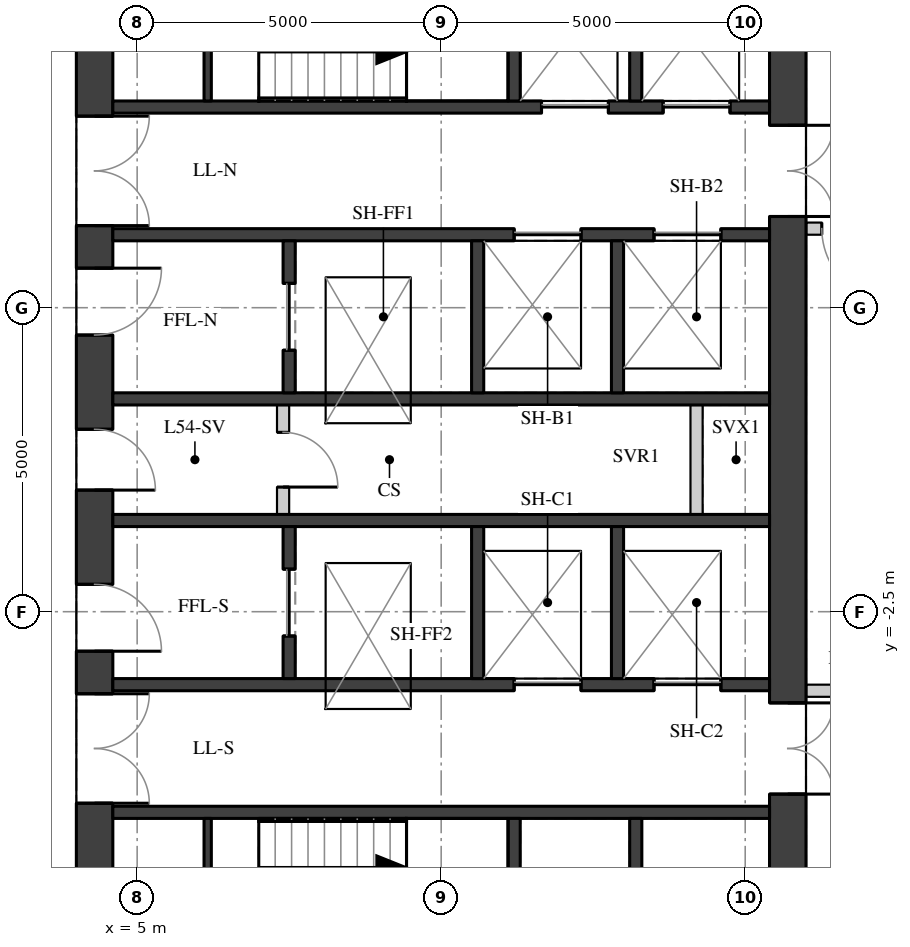
"""IFC4 building model, lengths in metres.
Left out: names, types, materials, properties, quantities, classifications, styles, units other than length and angle.
Written with IfcOpenShell. Run it as: python <this file> out.ifc"""

import sys

from ifc_helpers import new_model, si_unit, direction, frame, frame_2d, origin, place, context, subcontext, project, spatial, rectangle, extrude, element, fill, save


model = new_model("IFC4")
c1 = context("Model", 3, precision=1e-05, world=origin(), true_north=direction((0.0, 1.0)))
c2 = subcontext(c1, "Body", "Model", "MODEL_VIEW")
j1 = project(units=[si_unit("LENGTHUNIT", "METRE"), si_unit("PLANEANGLEUNIT", "RADIAN")], contexts=[c1])
p1 = place(None, origin())
s1 = spatial("IfcSite", under=j1, at=p1, CompositionType="ELEMENT")
p2 = place(p1, origin())
s2 = spatial("IfcBuilding", under=s1, at=p2, CompositionType="ELEMENT")
p3 = place(p2, frame((0.0, 0.0, 192.5)))
s3 = spatial("IfcBuildingStorey", under=s2, at=p3, CompositionType="ELEMENT", Elevation=192.5)
p4 = place(p3, frame((4.3, -9.4, 0.0), z_axis=(0.0, 0.0, 1.0), x_axis=(0.0, 1.0, 0.0)))
e1 = element("IfcWall", 1, at=p4, inside=s3, PredefinedType="SHEAR", context=c2, shape_type="SweptSolid", body=[
    extrude(rectangle(XDim=18.8, YDim=0.6, at=frame_2d((9.4, 0.0))), origin(), (0.0, 0.0, 1.0), 3.02),
])
p5 = place(p4, frame((0.65, 0.0, 0.0)))
e2 = element("IfcOpeningElement", 2, at=p5, cuts=e1, PredefinedType="OPENING", context=c2, shape_type="SweptSolid", body=[
    extrude(rectangle(XDim=1.5, YDim=2.1, at=frame_2d((0.75, 1.05))), frame((0.0, 0.31, 0.0), z_axis=(0.0, -1.0, 0.0), x_axis=(1.0, 0.0, 0.0)), (0.0, 0.0, 1.0), 0.62),
])
p6 = place(p4, frame((3.75, 0.0, 0.0)))
e3 = element("IfcOpeningElement", 3, at=p6, cuts=e1, PredefinedType="OPENING", context=c2, shape_type="SweptSolid", body=[
    extrude(rectangle(XDim=1.8, YDim=2.1, at=frame_2d((0.9, 1.05))), frame((0.0, 0.31, 0.0), z_axis=(0.0, -1.0, 0.0), x_axis=(1.0, 0.0, 0.0)), (0.0, 0.0, 1.0), 0.62),
])
p7 = place(p4, frame((6.25, 0.0, 0.0)))
e4 = element("IfcOpeningElement", 4, at=p7, cuts=e1, PredefinedType="OPENING", context=c2, shape_type="SweptSolid", body=[
    extrude(rectangle(XDim=1.1, YDim=2.1, at=frame_2d((0.55, 1.05))), frame((0.0, 0.31, 0.0), z_axis=(0.0, -1.0, 0.0), x_axis=(1.0, 0.0, 0.0)), (0.0, 0.0, 1.0), 0.62),
])
p8 = place(p4, frame((8.9, 0.0, 0.0)))
e5 = element("IfcOpeningElement", 5, at=p8, cuts=e1, PredefinedType="OPENING", context=c2, shape_type="SweptSolid", body=[
    extrude(rectangle(XDim=1.0, YDim=2.1, at=frame_2d((0.5, 1.05))), frame((0.0, 0.31, 0.0), z_axis=(0.0, -1.0, 0.0), x_axis=(1.0, 0.0, 0.0)), (0.0, 0.0, 1.0), 0.62),
])
p9 = place(p4, frame((11.45, 0.0, 0.0)))
e6 = element("IfcOpeningElement", 6, at=p9, cuts=e1, PredefinedType="OPENING", context=c2, shape_type="SweptSolid", body=[
    extrude(rectangle(XDim=1.1, YDim=2.1, at=frame_2d((0.55, 1.05))), frame((0.0, 0.31, 0.0), z_axis=(0.0, -1.0, 0.0), x_axis=(1.0, 0.0, 0.0)), (0.0, 0.0, 1.0), 0.62),
])
p10 = place(p4, frame((13.25, 0.0, 0.0)))
e7 = element("IfcOpeningElement", 7, at=p10, cuts=e1, PredefinedType="OPENING", context=c2, shape_type="SweptSolid", body=[
    extrude(rectangle(XDim=1.8, YDim=2.1, at=frame_2d((0.9, 1.05))), frame((0.0, 0.31, 0.0), z_axis=(0.0, -1.0, 0.0), x_axis=(1.0, 0.0, 0.0)), (0.0, 0.0, 1.0), 0.62),
])
p11 = place(p4, frame((16.65, 0.0, 0.0)))
e8 = element("IfcOpeningElement", 8, at=p11, cuts=e1, PredefinedType="OPENING", context=c2, shape_type="SweptSolid", body=[
    extrude(rectangle(XDim=1.5, YDim=2.1, at=frame_2d((0.75, 1.05))), frame((0.0, 0.31, 0.0), z_axis=(0.0, -1.0, 0.0), x_axis=(1.0, 0.0, 0.0)), (0.0, 0.0, 1.0), 0.62),
])
p12 = place(p3, frame((15.7, -9.4, 0.0), z_axis=(0.0, 0.0, 1.0), x_axis=(0.0, 1.0, 0.0)))
e9 = element("IfcWall", 9, at=p12, inside=s3, PredefinedType="SHEAR", context=c2, shape_type="SweptSolid", body=[
    extrude(rectangle(XDim=18.8, YDim=0.6, at=frame_2d((9.4, 0.0))), origin(), (0.0, 0.0, 1.0), 3.02),
])
p13 = place(p12, frame((13.4, 0.0, 0.0)))
e10 = element("IfcOpeningElement", 10, at=p13, cuts=e9, PredefinedType="OPENING", context=c2, shape_type="SweptSolid", body=[
    extrude(rectangle(XDim=1.5, YDim=2.1, at=frame_2d((0.75, 1.05))), frame((0.0, 0.31, 0.0), z_axis=(0.0, -1.0, 0.0), x_axis=(1.0, 0.0, 0.0)), (0.0, 0.0, 1.0), 0.62),
])
p14 = place(p12, frame((3.9, 0.0, 0.0)))
e11 = element("IfcOpeningElement", 11, at=p14, cuts=e9, PredefinedType="OPENING", context=c2, shape_type="SweptSolid", body=[
    extrude(rectangle(XDim=1.5, YDim=2.1, at=frame_2d((0.75, 1.05))), frame((0.0, 0.31, 0.0), z_axis=(0.0, -1.0, 0.0), x_axis=(1.0, 0.0, 0.0)), (0.0, 0.0, 1.0), 0.62),
])
p15 = place(p3, frame((4.6, 5.8, 0.0), z_axis=(0.0, 0.0, 1.0), x_axis=(1.0, 0.0, 0.0)))
e12 = element("IfcWall", 12, at=p15, inside=s3, PredefinedType="SHEAR", context=c2, shape_type="SweptSolid", body=[
    extrude(rectangle(XDim=10.8, YDim=0.2, at=frame_2d((5.4, 0.0))), origin(), (0.0, 0.0, 1.0), 3.02),
])
p16 = place(p15, frame((7.05, 0.0, 0.0)))
e13 = element("IfcOpeningElement", 13, at=p16, cuts=e12, PredefinedType="OPENING", context=c2, shape_type="SweptSolid", body=[
    extrude(rectangle(XDim=1.1, YDim=2.1, at=frame_2d((0.55, 1.05))), frame((0.0, 0.11, 0.0), z_axis=(0.0, -1.0, 0.0), x_axis=(1.0, 0.0, 0.0)), (0.0, 0.0, 1.0), 0.22),
])
p17 = place(p15, frame((9.05, 0.0, 0.0)))
e14 = element("IfcOpeningElement", 14, at=p17, cuts=e12, PredefinedType="OPENING", context=c2, shape_type="SweptSolid", body=[
    extrude(rectangle(XDim=1.1, YDim=2.1, at=frame_2d((0.55, 1.05))), frame((0.0, 0.11, 0.0), z_axis=(0.0, -1.0, 0.0), x_axis=(1.0, 0.0, 0.0)), (0.0, 0.0, 1.0), 0.22),
])
p18 = place(p3, frame((4.6, 3.7, 0.0), z_axis=(0.0, 0.0, 1.0), x_axis=(1.0, 0.0, 0.0)))
e15 = element("IfcWall", 15, at=p18, inside=s3, PredefinedType="SHEAR", context=c2, shape_type="SweptSolid", body=[
    extrude(rectangle(XDim=10.8, YDim=0.2, at=frame_2d((5.4, 0.0))), origin(), (0.0, 0.0, 1.0), 3.02),
])
p19 = place(p18, frame((6.6, 0.0, 0.0)))
e16 = element("IfcOpeningElement", 16, at=p19, cuts=e15, PredefinedType="OPENING", context=c2, shape_type="SweptSolid", body=[
    extrude(rectangle(XDim=1.1, YDim=2.1, at=frame_2d((0.55, 1.05))), frame((0.0, 0.11, 0.0), z_axis=(0.0, -1.0, 0.0), x_axis=(1.0, 0.0, 0.0)), (0.0, 0.0, 1.0), 0.22),
])
p20 = place(p18, frame((8.9, 0.0, 0.0)))
e17 = element("IfcOpeningElement", 17, at=p20, cuts=e15, PredefinedType="OPENING", context=c2, shape_type="SweptSolid", body=[
    extrude(rectangle(XDim=1.1, YDim=2.1, at=frame_2d((0.55, 1.05))), frame((0.0, 0.11, 0.0), z_axis=(0.0, -1.0, 0.0), x_axis=(1.0, 0.0, 0.0)), (0.0, 0.0, 1.0), 0.22),
])
for number, where, z_axis, x_axis in (
    (18, (4.6, 1.0, 0.0), (0.0, 0.0, 1.0), (1.0, 0.0, 0.0)),
    (19, (4.6, -1.0, 0.0), (0.0, 0.0, 1.0), (1.0, 0.0, 0.0)),
):
    element("IfcWall", number, at=place(p3, frame(where, z_axis=z_axis, x_axis=x_axis)), inside=s3, PredefinedType="SHEAR", context=c2, shape_type="SweptSolid", body=[
        extrude(rectangle(XDim=10.8, YDim=0.2, at=frame_2d((5.4, 0.0))), origin(), (0.0, 0.0, 1.0), 3.02),
    ])
p21 = place(p3, frame((4.6, -3.7, 0.0), z_axis=(0.0, 0.0, 1.0), x_axis=(1.0, 0.0, 0.0)))
e20 = element("IfcWall", 20, at=p21, inside=s3, PredefinedType="SHEAR", context=c2, shape_type="SweptSolid", body=[
    extrude(rectangle(XDim=10.8, YDim=0.2, at=frame_2d((5.4, 0.0))), origin(), (0.0, 0.0, 1.0), 3.02),
])
p22 = place(p21, frame((6.6, 0.0, 0.0)))
e21 = element("IfcOpeningElement", 21, at=p22, cuts=e20, PredefinedType="OPENING", context=c2, shape_type="SweptSolid", body=[
    extrude(rectangle(XDim=1.1, YDim=2.1, at=frame_2d((0.55, 1.05))), frame((0.0, 0.11, 0.0), z_axis=(0.0, -1.0, 0.0), x_axis=(1.0, 0.0, 0.0)), (0.0, 0.0, 1.0), 0.22),
])
p23 = place(p21, frame((8.9, 0.0, 0.0)))
e22 = element("IfcOpeningElement", 22, at=p23, cuts=e20, PredefinedType="OPENING", context=c2, shape_type="SweptSolid", body=[
    extrude(rectangle(XDim=1.1, YDim=2.1, at=frame_2d((0.55, 1.05))), frame((0.0, 0.11, 0.0), z_axis=(0.0, -1.0, 0.0), x_axis=(1.0, 0.0, 0.0)), (0.0, 0.0, 1.0), 0.22),
])
p24 = place(p3, frame((4.6, -5.8, 0.0), z_axis=(0.0, 0.0, 1.0), x_axis=(1.0, 0.0, 0.0)))
e23 = element("IfcWall", 23, at=p24, inside=s3, PredefinedType="SHEAR", context=c2, shape_type="SweptSolid", body=[
    extrude(rectangle(XDim=10.8, YDim=0.2, at=frame_2d((5.4, 0.0))), origin(), (0.0, 0.0, 1.0), 3.02),
])
for number, where, z_axis, x_axis in (
    (24, (11.2, 5.9, 0.0), (0.0, 0.0, 1.0), (0.0, 1.0, 0.0)),
    (25, (11.2, -9.4, 0.0), (0.0, 0.0, 1.0), (0.0, 1.0, 0.0)),
    (26, (13.2, 5.9, 0.0), (0.0, 0.0, 1.0), (0.0, 1.0, 0.0)),
    (27, (13.2, -9.4, 0.0), (0.0, 0.0, 1.0), (0.0, 1.0, 0.0)),
):
    element("IfcWall", number, at=place(p3, frame(where, z_axis=z_axis, x_axis=x_axis)), inside=s3, PredefinedType="SHEAR", context=c2, shape_type="SweptSolid", body=[
        extrude(rectangle(XDim=3.5, YDim=0.2, at=frame_2d((1.75, 0.0))), origin(), (0.0, 0.0, 1.0), 3.02),
    ])
p25 = place(p3, frame((7.5, 1.1, 0.0), z_axis=(0.0, 0.0, 1.0), x_axis=(0.0, 1.0, 0.0)))
e28 = element("IfcWall", 28, at=p25, inside=s3, PredefinedType="SHEAR", context=c2, shape_type="SweptSolid", body=[
    extrude(rectangle(XDim=2.5, YDim=0.2, at=frame_2d((1.25, 0.0))), origin(), (0.0, 0.0, 1.0), 3.02),
])
p26 = place(p25, frame((0.7, 0.0, 0.0)))
e29 = element("IfcOpeningElement", 29, at=p26, cuts=e28, PredefinedType="OPENING", context=c2, shape_type="SweptSolid", body=[
    extrude(rectangle(XDim=1.1, YDim=2.1, at=frame_2d((0.55, 1.05))), frame((0.0, 0.11, 0.0), z_axis=(0.0, -1.0, 0.0), x_axis=(1.0, 0.0, 0.0)), (0.0, 0.0, 1.0), 0.22),
])
p27 = place(p3, frame((7.5, -3.6, 0.0), z_axis=(0.0, 0.0, 1.0), x_axis=(0.0, 1.0, 0.0)))
e30 = element("IfcWall", 30, at=p27, inside=s3, PredefinedType="SHEAR", context=c2, shape_type="SweptSolid", body=[
    extrude(rectangle(XDim=2.5, YDim=0.2, at=frame_2d((1.25, 0.0))), origin(), (0.0, 0.0, 1.0), 3.02),
])
p28 = place(p27, frame((0.7, 0.0, 0.0)))
e31 = element("IfcOpeningElement", 31, at=p28, cuts=e30, PredefinedType="OPENING", context=c2, shape_type="SweptSolid", body=[
    extrude(rectangle(XDim=1.1, YDim=2.1, at=frame_2d((0.55, 1.05))), frame((0.0, 0.11, 0.0), z_axis=(0.0, -1.0, 0.0), x_axis=(1.0, 0.0, 0.0)), (0.0, 0.0, 1.0), 0.22),
])
for number, where, z_axis, x_axis in (
    (32, (10.6, 1.1, 0.0), (0.0, 0.0, 1.0), (0.0, 1.0, 0.0)),
    (33, (10.6, -3.6, 0.0), (0.0, 0.0, 1.0), (0.0, 1.0, 0.0)),
    (34, (12.9, 1.1, 0.0), (0.0, 0.0, 1.0), (0.0, 1.0, 0.0)),
    (35, (12.9, -3.6, 0.0), (0.0, 0.0, 1.0), (0.0, 1.0, 0.0)),
):
    element("IfcWall", number, at=place(p3, frame(where, z_axis=z_axis, x_axis=x_axis)), inside=s3, PredefinedType="SHEAR", context=c2, shape_type="SweptSolid", body=[
        extrude(rectangle(XDim=2.5, YDim=0.2, at=frame_2d((1.25, 0.0))), origin(), (0.0, 0.0, 1.0), 3.02),
    ])
p29 = place(p3, frame((6.16, 5.9, 0.0), z_axis=(0.0, 0.0, 1.0), x_axis=(0.0, 1.0, 0.0)))
e36 = element("IfcWall", 36, at=p29, inside=s3, PredefinedType="SHEAR", context=c2, shape_type="SweptSolid", body=[
    extrude(rectangle(XDim=3.5, YDim=0.12, at=frame_2d((1.75, 0.0))), origin(), (0.0, 0.0, 1.0), 3.02),
])
p30 = place(p29, frame((0.85, 0.0, 0.0)))
e37 = element("IfcOpeningElement", 37, at=p30, cuts=e36, PredefinedType="OPENING", context=c2, shape_type="SweptSolid", body=[
    extrude(rectangle(XDim=1.5, YDim=2.1, at=frame_2d((0.75, 1.05))), frame((0.0, 0.07, 0.0), z_axis=(0.0, -1.0, 0.0), x_axis=(1.0, 0.0, 0.0)), (0.0, 0.0, 1.0), 0.14),
])
p31 = place(p3, frame((6.16, -9.4, 0.0), z_axis=(0.0, 0.0, 1.0), x_axis=(0.0, 1.0, 0.0)))
e38 = element("IfcWall", 38, at=p31, inside=s3, PredefinedType="SHEAR", context=c2, shape_type="SweptSolid", body=[
    extrude(rectangle(XDim=3.5, YDim=0.12, at=frame_2d((1.75, 0.0))), origin(), (0.0, 0.0, 1.0), 3.02),
])
p32 = place(p31, frame((1.15, 0.0, 0.0)))
e39 = element("IfcOpeningElement", 39, at=p32, cuts=e38, PredefinedType="OPENING", context=c2, shape_type="SweptSolid", body=[
    extrude(rectangle(XDim=1.5, YDim=2.1, at=frame_2d((0.75, 1.05))), frame((0.0, 0.07, 0.0), z_axis=(0.0, -1.0, 0.0), x_axis=(1.0, 0.0, 0.0)), (0.0, 0.0, 1.0), 0.14),
])
p33 = place(p3, frame((7.4, -0.9, 0.0), z_axis=(0.0, 0.0, 1.0), x_axis=(0.0, 1.0, 0.0)))
e40 = element("IfcWall", 40, at=p33, inside=s3, PredefinedType="PARTITIONING", context=c2, shape_type="SweptSolid", body=[
    extrude(rectangle(XDim=1.8, YDim=0.2, at=frame_2d((0.9, 0.0))), origin(), (0.0, 0.0, 1.0), 3.02),
])
p34 = place(p33, frame((0.45, 0.0, 0.0)))
e41 = element("IfcOpeningElement", 41, at=p34, cuts=e40, PredefinedType="OPENING", context=c2, shape_type="SweptSolid", body=[
    extrude(rectangle(XDim=0.9, YDim=2.1, at=frame_2d((0.45, 1.05))), frame((0.0, 0.11, 0.0), z_axis=(0.0, -1.0, 0.0), x_axis=(1.0, 0.0, 0.0)), (0.0, 0.0, 1.0), 0.22),
])
p35 = place(p3, frame((14.2, -0.9, 0.0), z_axis=(0.0, 0.0, 1.0), x_axis=(0.0, 1.0, 0.0)))
e42 = element("IfcWall", 42, at=p35, inside=s3, PredefinedType="PARTITIONING", context=c2, shape_type="SweptSolid", body=[
    extrude(rectangle(XDim=1.8, YDim=0.2, at=frame_2d((0.9, 0.0))), origin(), (0.0, 0.0, 1.0), 3.02),
])
p36 = place(p3, frame((17.6, 3.8, 0.0), z_axis=(0.0, 0.0, 1.0), x_axis=(-1.0, 0.0, 0.0)))
e43 = element("IfcWall", 43, at=p36, inside=s3, PredefinedType="PARTITIONING", context=c2, shape_type="SweptSolid", body=[
    extrude(rectangle(XDim=1.596, YDim=0.2, at=frame_2d((0.798, 0.0))), origin(), (0.0, 0.0, 1.0), 3.02),
])
p37 = place(p36, frame((0.14, 0.0, 0.0)))
e44 = element("IfcOpeningElement", 44, at=p37, cuts=e43, PredefinedType="OPENING", context=c2, shape_type="SweptSolid", body=[
    extrude(rectangle(XDim=1.2, YDim=2.1, at=frame_2d((0.6, 1.05))), frame((0.0, 0.11, 0.0), z_axis=(0.0, -1.0, 0.0), x_axis=(1.0, 0.0, 0.0)), (0.0, 0.0, 1.0), 0.22),
])
p38 = place(p3, frame((16.004, -3.8, 0.0), z_axis=(0.0, 0.0, 1.0), x_axis=(1.0, 0.0, 0.0)))
e45 = element("IfcWall", 45, at=p38, inside=s3, PredefinedType="PARTITIONING", context=c2, shape_type="SweptSolid", body=[
    extrude(rectangle(XDim=1.596, YDim=0.2, at=frame_2d((0.798, 0.0))), origin(), (0.0, 0.0, 1.0), 2.47),
])
p39 = place(p6, origin())
e46 = element("IfcDoor", 46, at=p39, inside=s3, OperationType="DOUBLE_DOOR_SINGLE_SWING", PredefinedType="DOOR", context=c2, shape_type="SweptSolid", body=[
    extrude(rectangle(XDim=1.8, YDim=2.1, at=frame_2d((0.9, 1.05))), frame((0.0, 0.025, 0.0), z_axis=(0.0, -1.0, 0.0), x_axis=(1.0, 0.0, 0.0)), (0.0, 0.0, 1.0), 0.05),
])
fill(e3, e46)
p40 = place(p7, origin())
e47 = element("IfcDoor", 47, at=p40, inside=s3, OperationType="SINGLE_SWING_RIGHT", PredefinedType="DOOR", context=c2, shape_type="SweptSolid", body=[
    extrude(rectangle(XDim=1.1, YDim=2.1, at=frame_2d((0.55, 1.05))), frame((0.0, 0.025, 0.0), z_axis=(0.0, -1.0, 0.0), x_axis=(1.0, 0.0, 0.0)), (0.0, 0.0, 1.0), 0.05),
])
fill(e4, e47)
p41 = place(p8, origin())
e48 = element("IfcDoor", 48, at=p41, inside=s3, OperationType="SINGLE_SWING_RIGHT", PredefinedType="DOOR", context=c2, shape_type="SweptSolid", body=[
    extrude(rectangle(XDim=1.0, YDim=2.1, at=frame_2d((0.5, 1.05))), frame((0.0, 0.025, 0.0), z_axis=(0.0, -1.0, 0.0), x_axis=(1.0, 0.0, 0.0)), (0.0, 0.0, 1.0), 0.05),
])
fill(e5, e48)
p42 = place(p9, origin())
e49 = element("IfcDoor", 49, at=p42, inside=s3, OperationType="SINGLE_SWING_LEFT", PredefinedType="DOOR", context=c2, shape_type="SweptSolid", body=[
    extrude(rectangle(XDim=1.1, YDim=2.1, at=frame_2d((0.55, 1.05))), frame((0.0, 0.025, 0.0), z_axis=(0.0, -1.0, 0.0), x_axis=(1.0, 0.0, 0.0)), (0.0, 0.0, 1.0), 0.05),
])
fill(e6, e49)
p43 = place(p10, origin())
e50 = element("IfcDoor", 50, at=p43, inside=s3, OperationType="DOUBLE_DOOR_SINGLE_SWING", PredefinedType="DOOR", context=c2, shape_type="SweptSolid", body=[
    extrude(rectangle(XDim=1.8, YDim=2.1, at=frame_2d((0.9, 1.05))), frame((0.0, 0.025, 0.0), z_axis=(0.0, -1.0, 0.0), x_axis=(1.0, 0.0, 0.0)), (0.0, 0.0, 1.0), 0.05),
])
fill(e7, e50)
p44 = place(p13, origin())
e51 = element("IfcDoor", 51, at=p44, inside=s3, OperationType="DOUBLE_DOOR_SINGLE_SWING", PredefinedType="DOOR", context=c2, shape_type="SweptSolid", body=[
    extrude(rectangle(XDim=1.5, YDim=2.1, at=frame_2d((0.75, 1.05))), frame((0.0, 0.025, 0.0), z_axis=(0.0, -1.0, 0.0), x_axis=(1.0, 0.0, 0.0)), (0.0, 0.0, 1.0), 0.05),
])
fill(e10, e51)
p45 = place(p14, origin())
e52 = element("IfcDoor", 52, at=p45, inside=s3, OperationType="DOUBLE_DOOR_SINGLE_SWING", PredefinedType="DOOR", context=c2, shape_type="SweptSolid", body=[
    extrude(rectangle(XDim=1.5, YDim=2.1, at=frame_2d((0.75, 1.05))), frame((0.0, 0.025, 0.0), z_axis=(0.0, -1.0, 0.0), x_axis=(1.0, 0.0, 0.0)), (0.0, 0.0, 1.0), 0.05),
])
fill(e11, e52)
p46 = place(p16, origin())
e53 = element("IfcDoor", 53, at=p46, inside=s3, OperationType="DOUBLE_DOOR_SLIDING", PredefinedType="DOOR", context=c2, shape_type="SweptSolid", body=[
    extrude(rectangle(XDim=1.1, YDim=2.1, at=frame_2d((0.55, 1.05))), frame((0.0, 0.025, 0.0), z_axis=(0.0, -1.0, 0.0), x_axis=(1.0, 0.0, 0.0)), (0.0, 0.0, 1.0), 0.05),
])
fill(e13, e53)
p47 = place(p17, origin())
e54 = element("IfcDoor", 54, at=p47, inside=s3, OperationType="DOUBLE_DOOR_SLIDING", PredefinedType="DOOR", context=c2, shape_type="SweptSolid", body=[
    extrude(rectangle(XDim=1.1, YDim=2.1, at=frame_2d((0.55, 1.05))), frame((0.0, 0.025, 0.0), z_axis=(0.0, -1.0, 0.0), x_axis=(1.0, 0.0, 0.0)), (0.0, 0.0, 1.0), 0.05),
])
fill(e14, e54)
p48 = place(p19, origin())
e55 = element("IfcDoor", 55, at=p48, inside=s3, OperationType="DOUBLE_DOOR_SLIDING", PredefinedType="DOOR", context=c2, shape_type="SweptSolid", body=[
    extrude(rectangle(XDim=1.1, YDim=2.1, at=frame_2d((0.55, 1.05))), frame((0.0, 0.025, 0.0), z_axis=(0.0, -1.0, 0.0), x_axis=(1.0, 0.0, 0.0)), (0.0, 0.0, 1.0), 0.05),
])
fill(e16, e55)
p49 = place(p20, origin())
e56 = element("IfcDoor", 56, at=p49, inside=s3, OperationType="DOUBLE_DOOR_SLIDING", PredefinedType="DOOR", context=c2, shape_type="SweptSolid", body=[
    extrude(rectangle(XDim=1.1, YDim=2.1, at=frame_2d((0.55, 1.05))), frame((0.0, 0.025, 0.0), z_axis=(0.0, -1.0, 0.0), x_axis=(1.0, 0.0, 0.0)), (0.0, 0.0, 1.0), 0.05),
])
fill(e17, e56)
p50 = place(p22, origin())
e57 = element("IfcDoor", 57, at=p50, inside=s3, OperationType="DOUBLE_DOOR_SLIDING", PredefinedType="DOOR", context=c2, shape_type="SweptSolid", body=[
    extrude(rectangle(XDim=1.1, YDim=2.1, at=frame_2d((0.55, 1.05))), frame((0.0, 0.025, 0.0), z_axis=(0.0, -1.0, 0.0), x_axis=(1.0, 0.0, 0.0)), (0.0, 0.0, 1.0), 0.05),
])
fill(e21, e57)
p51 = place(p23, origin())
e58 = element("IfcDoor", 58, at=p51, inside=s3, OperationType="DOUBLE_DOOR_SLIDING", PredefinedType="DOOR", context=c2, shape_type="SweptSolid", body=[
    extrude(rectangle(XDim=1.1, YDim=2.1, at=frame_2d((0.55, 1.05))), frame((0.0, 0.025, 0.0), z_axis=(0.0, -1.0, 0.0), x_axis=(1.0, 0.0, 0.0)), (0.0, 0.0, 1.0), 0.05),
])
fill(e22, e58)
p52 = place(p26, origin())
e59 = element("IfcDoor", 59, at=p52, inside=s3, OperationType="DOUBLE_DOOR_SLIDING", PredefinedType="DOOR", context=c2, shape_type="SweptSolid", body=[
    extrude(rectangle(XDim=1.1, YDim=2.1, at=frame_2d((0.55, 1.05))), frame((0.0, 0.025, 0.0), z_axis=(0.0, -1.0, 0.0), x_axis=(1.0, 0.0, 0.0)), (0.0, 0.0, 1.0), 0.05),
])
fill(e29, e59)
p53 = place(p28, origin())
e60 = element("IfcDoor", 60, at=p53, inside=s3, OperationType="DOUBLE_DOOR_SLIDING", PredefinedType="DOOR", context=c2, shape_type="SweptSolid", body=[
    extrude(rectangle(XDim=1.1, YDim=2.1, at=frame_2d((0.55, 1.05))), frame((0.0, 0.025, 0.0), z_axis=(0.0, -1.0, 0.0), x_axis=(1.0, 0.0, 0.0)), (0.0, 0.0, 1.0), 0.05),
])
fill(e31, e60)
p54 = place(p34, origin())
e61 = element("IfcDoor", 61, at=p54, inside=s3, OperationType="SINGLE_SWING_RIGHT", PredefinedType="DOOR", context=c2, shape_type="SweptSolid", body=[
    extrude(rectangle(XDim=0.9, YDim=2.1, at=frame_2d((0.45, 1.05))), frame((0.0, 0.025, 0.0), z_axis=(0.0, -1.0, 0.0), x_axis=(1.0, 0.0, 0.0)), (0.0, 0.0, 1.0), 0.05),
])
fill(e41, e61)
p55 = place(p37, origin())
e62 = element("IfcDoor", 62, at=p55, inside=s3, OperationType="SINGLE_SWING_LEFT", PredefinedType="DOOR", context=c2, shape_type="SweptSolid", body=[
    extrude(rectangle(XDim=1.2, YDim=2.1, at=frame_2d((0.6, 1.05))), frame((0.0, 0.025, 0.0), z_axis=(0.0, -1.0, 0.0), x_axis=(1.0, 0.0, 0.0)), (0.0, 0.0, 1.0), 0.05),
])
fill(e44, e62)
save(model, sys.argv[1])
